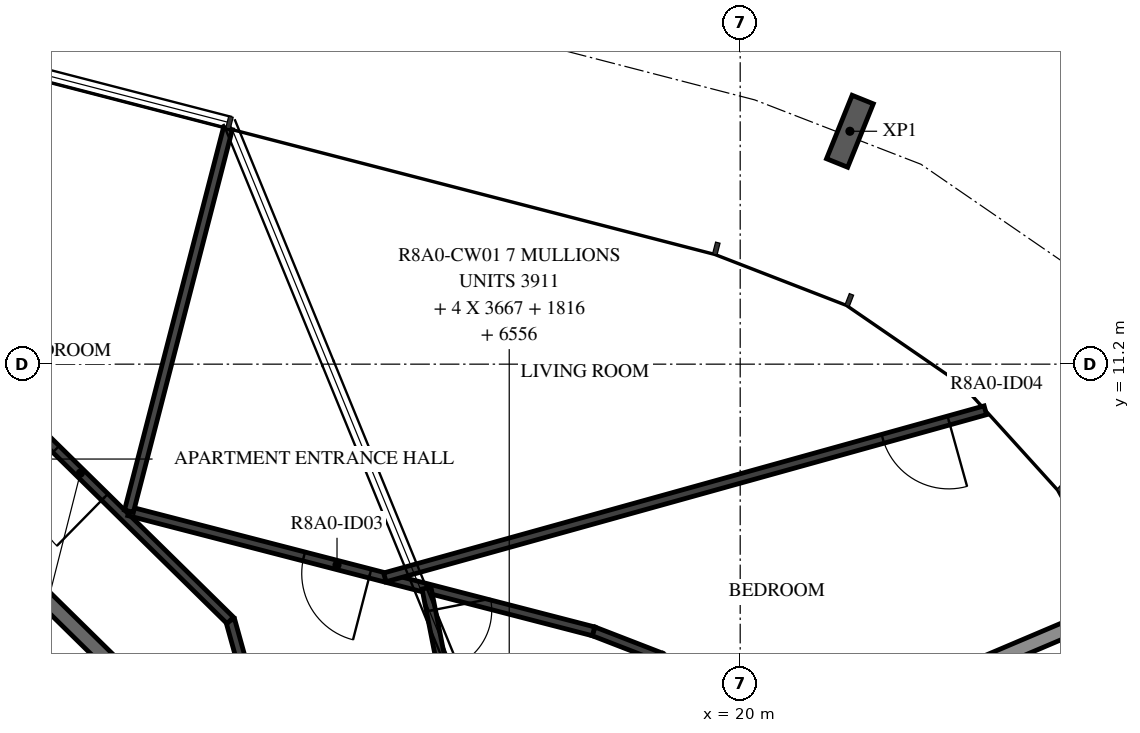
"""IFC4 building model, lengths in metres.
Left out: names, types, materials, properties, quantities, classifications, styles, units other than length and angle.
Written with IfcOpenShell. Run it as: python <this file> out.ifc"""

import sys

from ifc_helpers import new_model, si_unit, direction, frame, frame_2d, origin, origin_2d, place, context, subcontext, project, spatial, rectangle, i_section, extrude, element, fill, save


model = new_model("IFC4")
c1 = context("Model", 3, precision=1e-05, world=origin(), true_north=direction((0.0, 1.0)))
c2 = subcontext(c1, "Body", "Model", "MODEL_VIEW")
j1 = project(units=[si_unit("LENGTHUNIT", "METRE"), si_unit("PLANEANGLEUNIT", "RADIAN")], contexts=[c1])
p1 = place(None, origin())
s1 = spatial("IfcSite", under=j1, at=p1, CompositionType="ELEMENT")
p2 = place(p1, origin())
s2 = spatial("IfcBuilding", under=s1, at=p2, CompositionType="ELEMENT")
p3 = place(p2, frame((0.0, 0.0, 305.2)))
s3 = spatial("IfcBuildingStorey", under=s2, at=p3, CompositionType="ELEMENT", Elevation=305.2)
p4 = place(p3, frame((21.443, 14.264, -0.38), z_axis=(0.0, 0.0, 1.0), x_axis=(0.927294785217, -0.374331913293, 0.0)))
e1 = element("IfcColumn", 1, at=p4, inside=s3, PredefinedType="COLUMN", context=c2, shape_type="SweptSolid", body=[
    extrude(i_section(OverallWidth=0.3, OverallDepth=0.9, WebThickness=0.019, FlangeThickness=0.035, FilletRadius=0.03, at=origin_2d()), origin(), (0.0, 0.0, 1.0), 3.5),
])
p5 = place(p3, frame((11.953, 7.041, 0.0), z_axis=(0.0, 0.0, 1.0), x_axis=(-0.713250549143, 0.70090916255, 0.0)))
e2 = element("IfcWall", 2, at=p5, inside=s3, PredefinedType="STANDARD", context=c2, shape_type="SweptSolid", body=[
    extrude(rectangle(XDim=7.181, YDim=0.2, at=frame_2d((3.59, 0.0))), origin(), (0.0, 0.0, 1.0), 3.12),
])
p6 = place(p5, frame((2.6, 0.0, 0.0)))
e3 = element("IfcOpeningElement", 3, at=p6, cuts=e2, PredefinedType="OPENING", context=c2, shape_type="SweptSolid", body=[
    extrude(rectangle(XDim=1.0, YDim=2.1, at=frame_2d((0.5, 1.05))), frame((0.0, 0.11, 0.0), z_axis=(0.0, -1.0, 0.0), x_axis=(1.0, 0.0, 0.0)), (0.0, 0.0, 1.0), 0.22),
])
p7 = place(p3, frame((21.684, 6.605, 0.0), z_axis=(0.0, 0.0, 1.0), x_axis=(0.920517820403, 0.390700578859, 0.0)))
e4 = element("IfcWall", 4, at=p7, inside=s3, PredefinedType="STANDARD", context=c2, shape_type="SweptSolid", body=[
    extrude(rectangle(XDim=3.619, YDim=0.2, at=frame_2d((1.809, 0.0))), origin(), (0.0, 0.0, 1.0), 2.73),
])
p8 = place(p3, frame((14.358, 3.982, 0.0), z_axis=(0.0, 0.0, 1.0), x_axis=(-0.267233823916, 0.963631715623, 0.0)))
e5 = element("IfcWall", 5, at=p8, inside=s3, PredefinedType="PARTITIONING", context=c2, shape_type="SweptSolid", body=[
    extrude(rectangle(XDim=3.992, YDim=0.12, at=frame_2d((1.996, 0.0))), origin(), (0.0, 0.0, 1.0), 3.12),
])
p9 = place(p8, frame((0.2, 0.0, 0.0)))
e6 = element("IfcOpeningElement", 6, at=p9, cuts=e5, PredefinedType="OPENING", context=c2, shape_type="SweptSolid", body=[
    extrude(rectangle(XDim=0.9, YDim=2.1, at=frame_2d((0.45, 1.05))), frame((0.0, 0.07, 0.0), z_axis=(0.0, -1.0, 0.0), x_axis=(1.0, 0.0, 0.0)), (0.0, 0.0, 1.0), 0.14),
])
p10 = place(p3, frame((13.291, 7.829, 0.0), z_axis=(0.0, 0.0, 1.0), x_axis=(-0.713255978622, 0.700903637428, 0.0)))
e7 = element("IfcWall", 7, at=p10, inside=s3, PredefinedType="PARTITIONING", context=c2, shape_type="SweptSolid", body=[
    extrude(rectangle(XDim=7.985, YDim=0.12, at=frame_2d((3.992, 0.0))), origin(), (0.0, 0.0, 1.0), 3.12),
])
p11 = place(p10, frame((2.314, 0.0, 0.0)))
e8 = element("IfcOpeningElement", 8, at=p11, cuts=e7, PredefinedType="OPENING", context=c2, shape_type="SweptSolid", body=[
    extrude(rectangle(XDim=0.9, YDim=2.1, at=frame_2d((0.45, 1.05))), frame((0.0, 0.07, 0.0), z_axis=(0.0, -1.0, 0.0), x_axis=(1.0, 0.0, 0.0)), (0.0, 0.0, 1.0), 0.14),
])
p12 = place(p3, frame((18.953, 7.343, 0.0), z_axis=(0.0, 0.0, 1.0), x_axis=(-0.932458839957, 0.361276226433, 0.0)))
e9 = element("IfcWall", 9, at=p12, inside=s3, PredefinedType="PARTITIONING", context=c2, shape_type="SweptSolid", body=[
    extrude(rectangle(XDim=0.947, YDim=0.12, at=frame_2d((0.473, 0.0))), origin(), (0.0, 0.0, 1.0), 3.12),
])
p13 = place(p3, frame((18.071, 7.685, 0.0), z_axis=(0.0, 0.0, 1.0), x_axis=(-0.968152245082, 0.250362198309, 0.0)))
e10 = element("IfcWall", 10, at=p13, inside=s3, PredefinedType="PARTITIONING", context=c2, shape_type="SweptSolid", body=[
    extrude(rectangle(XDim=6.313, YDim=0.12, at=frame_2d((3.157, 0.0))), origin(), (0.0, 0.0, 1.0), 3.12),
])
p14 = place(p13, frame((3.036, 0.0, 0.0)))
e11 = element("IfcOpeningElement", 11, at=p14, cuts=e10, PredefinedType="OPENING", context=c2, shape_type="SweptSolid", body=[
    extrude(rectangle(XDim=0.9, YDim=2.1, at=frame_2d((0.45, 1.05))), frame((0.0, 0.07, 0.0), z_axis=(0.0, -1.0, 0.0), x_axis=(1.0, 0.0, 0.0)), (0.0, 0.0, 1.0), 0.14),
])
p15 = place(p3, frame((15.873, 8.253, 0.0), z_axis=(0.0, 0.0, 1.0), x_axis=(0.19340687816, -0.981118636802, 0.0)))
e12 = element("IfcWall", 12, at=p15, inside=s3, PredefinedType="PARTITIONING", context=c2, shape_type="SweptSolid", body=[
    extrude(rectangle(XDim=1.941, YDim=0.12, at=frame_2d((0.971, 0.0))), origin(), (0.0, 0.0, 1.0), 3.12),
])
p16 = place(p15, frame((0.3, 0.0, 0.0)))
e13 = element("IfcOpeningElement", 13, at=p16, cuts=e12, PredefinedType="OPENING", context=c2, shape_type="SweptSolid", body=[
    extrude(rectangle(XDim=0.8, YDim=2.1, at=frame_2d((0.4, 1.05))), frame((0.0, 0.07, 0.0), z_axis=(0.0, -1.0, 0.0), x_axis=(1.0, 0.0, 0.0)), (0.0, 0.0, 1.0), 0.14),
])
p17 = place(p3, frame((23.225, 10.593, 0.0), z_axis=(0.0, 0.0, 1.0), x_axis=(-0.963409492722, -0.268033858559, 0.0)))
e14 = element("IfcWall", 14, at=p17, inside=s3, PredefinedType="PARTITIONING", context=c2, shape_type="SweptSolid", body=[
    extrude(rectangle(XDim=8.2, YDim=0.12, at=frame_2d((4.1, 0.0))), origin(), (0.0, 0.0, 1.0), 3.12),
])
p18 = place(p17, frame((0.5, 0.0, 0.0)))
e15 = element("IfcOpeningElement", 15, at=p18, cuts=e14, PredefinedType="OPENING", context=c2, shape_type="SweptSolid", body=[
    extrude(rectangle(XDim=0.9, YDim=2.1, at=frame_2d((0.45, 1.05))), frame((0.0, 0.07, 0.0), z_axis=(0.0, -1.0, 0.0), x_axis=(1.0, 0.0, 0.0)), (0.0, 0.0, 1.0), 0.14),
])
p19 = place(p3, frame((13.26, 14.3, 0.0), z_axis=(0.0, 0.0, 1.0), x_axis=(-0.25038206324, -0.968147107834, 0.0)))
e16 = element("IfcWall", 16, at=p19, inside=s3, PredefinedType="PARTITIONING", context=c2, shape_type="SweptSolid", body=[
    extrude(rectangle(XDim=5.2, YDim=0.12, at=frame_2d((2.6, 0.0))), origin(), (0.0, 0.0, 1.0), 2.73),
])
p20 = place(p11, origin())
e17 = element("IfcDoor", 17, at=p20, inside=s3, OperationType="SINGLE_SWING_LEFT", PredefinedType="DOOR", context=c2, shape_type="SweptSolid", body=[
    extrude(rectangle(XDim=0.9, YDim=2.1, at=frame_2d((0.45, 1.05))), frame((0.0, 0.025, 0.0), z_axis=(0.0, -1.0, 0.0), x_axis=(1.0, 0.0, 0.0)), (0.0, 0.0, 1.0), 0.05),
])
fill(e8, e17)
p21 = place(p16, origin())
e18 = element("IfcDoor", 18, at=p21, inside=s3, OperationType="SINGLE_SWING_LEFT", PredefinedType="DOOR", context=c2, shape_type="SweptSolid", body=[
    extrude(rectangle(XDim=0.8, YDim=2.1, at=frame_2d((0.4, 1.05))), frame((0.0, 0.025, 0.0), z_axis=(0.0, -1.0, 0.0), x_axis=(1.0, 0.0, 0.0)), (0.0, 0.0, 1.0), 0.05),
])
fill(e13, e18)
p22 = place(p14, origin())
e19 = element("IfcDoor", 19, at=p22, inside=s3, OperationType="SINGLE_SWING_LEFT", PredefinedType="DOOR", context=c2, shape_type="SweptSolid", body=[
    extrude(rectangle(XDim=0.9, YDim=2.1, at=frame_2d((0.45, 1.05))), frame((0.0, 0.025, 0.0), z_axis=(0.0, -1.0, 0.0), x_axis=(1.0, 0.0, 0.0)), (0.0, 0.0, 1.0), 0.05),
])
fill(e11, e19)
p23 = place(p18, origin())
e20 = element("IfcDoor", 20, at=p23, inside=s3, OperationType="SINGLE_SWING_LEFT", PredefinedType="DOOR", context=c2, shape_type="SweptSolid", body=[
    extrude(rectangle(XDim=0.9, YDim=2.1, at=frame_2d((0.45, 1.05))), frame((0.0, 0.025, 0.0), z_axis=(0.0, -1.0, 0.0), x_axis=(1.0, 0.0, 0.0)), (0.0, 0.0, 1.0), 0.05),
])
fill(e15, e20)
save(model, sys.argv[1])
